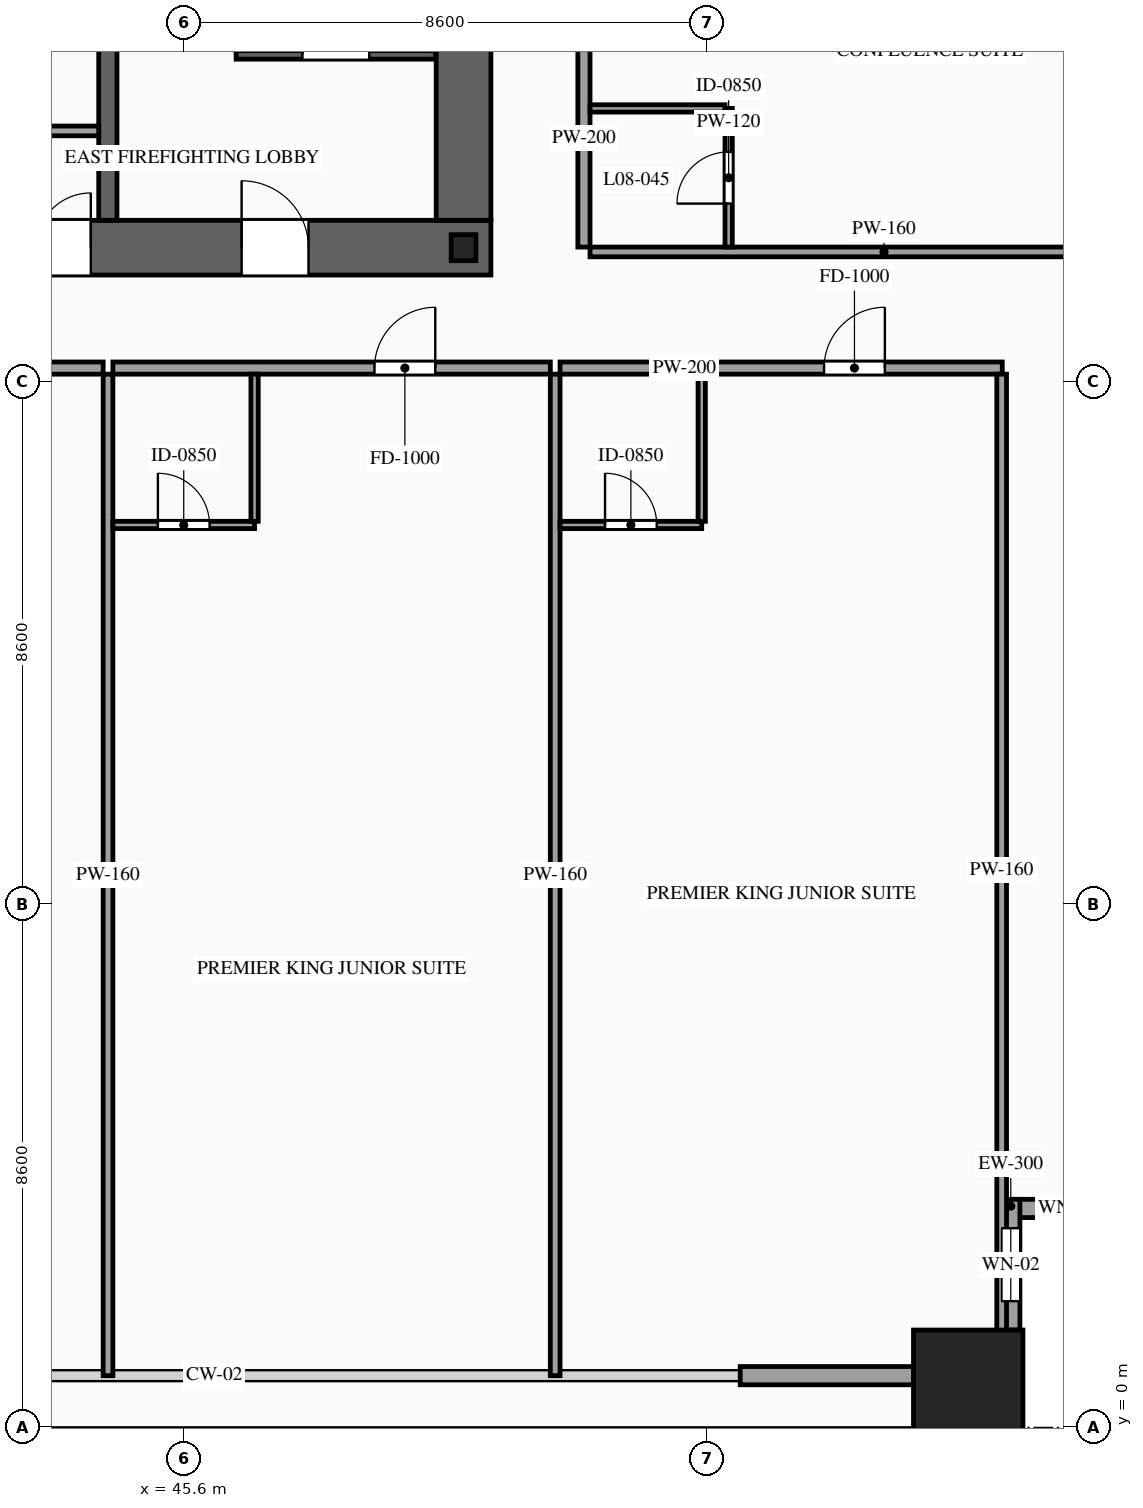
"""IFC4 building model, lengths in metres.
Left out: names, types, materials, properties, quantities, classifications, styles, units other than length and angle.
Written with IfcOpenShell. Run it as: python <this file> out.ifc"""

import sys

from ifc_helpers import new_model, si_unit, direction, frame, frame_2d, origin, origin_2d, place, context, subcontext, project, spatial, rectangle, hollow_rectangle, i_section, extrude, source, transform, mapped, element, fill, save


model = new_model("IFC4")
c1 = context("Model", 3, precision=1e-05, world=origin(), true_north=direction((0.0, 1.0)))
c2 = subcontext(c1, "Body", "Model", "MODEL_VIEW")
j1 = project(units=[si_unit("LENGTHUNIT", "METRE"), si_unit("PLANEANGLEUNIT", "RADIAN")], contexts=[c1])
p1 = place(None, origin())
s1 = spatial("IfcSite", under=j1, at=p1, CompositionType="ELEMENT")
p2 = place(p1, origin())
s2 = spatial("IfcBuilding", under=s1, at=p2, CompositionType="ELEMENT")
p3 = place(p2, frame((0.0, 0.0, 34.2)))
s3 = spatial("IfcBuildingStorey", under=s2, at=p3, CompositionType="ELEMENT", Elevation=34.2)
p4 = place(p3, frame((23.35, 19.4, 0.0), z_axis=(0.0, 0.0, 1.0), x_axis=(1.0, 0.0, 0.0)))
e1 = element("IfcWall", 1, at=p4, inside=s3, PredefinedType="SHEAR", context=c2, shape_type="SweptSolid", body=[
    extrude(rectangle(XDim=27.3, YDim=0.9, at=frame_2d((13.65, 0.0))), origin(), (0.0, 0.0, 1.0), 3.6),
])
p5 = place(p4, frame((2.1, 0.0, 0.0)))
e2 = element("IfcOpeningElement", 2, at=p5, cuts=e1, PredefinedType="OPENING", context=c2, shape_type="SweptSolid", body=[
    extrude(rectangle(XDim=1.1, YDim=2.2, at=frame_2d((0.55, 1.1))), frame((0.0, 0.465, 0.0), z_axis=(0.0, -1.0, 0.0), x_axis=(1.0, 0.0, 0.0)), (0.0, 0.0, 1.0), 0.93),
])
p6 = place(p4, frame((10.0, 0.0, 0.0)))
e3 = element("IfcOpeningElement", 3, at=p6, cuts=e1, PredefinedType="OPENING", context=c2, shape_type="SweptSolid", body=[
    extrude(rectangle(XDim=1.1, YDim=2.2, at=frame_2d((0.55, 1.1))), frame((0.0, 0.465, 0.0), z_axis=(0.0, -1.0, 0.0), x_axis=(1.0, 0.0, 0.0)), (0.0, 0.0, 1.0), 0.93),
])
p7 = place(p4, frame((23.2, 0.0, 0.0)))
e4 = element("IfcOpeningElement", 4, at=p7, cuts=e1, PredefinedType="OPENING", context=c2, shape_type="SweptSolid", body=[
    extrude(rectangle(XDim=1.1, YDim=2.2, at=frame_2d((0.55, 1.1))), frame((0.0, 0.465, 0.0), z_axis=(0.0, -1.0, 0.0), x_axis=(1.0, 0.0, 0.0)), (0.0, 0.0, 1.0), 0.93),
])
p8 = place(p4, frame((19.82, 0.0, 0.0)))
e5 = element("IfcOpeningElement", 5, at=p8, cuts=e1, PredefinedType="OPENING", context=c2, shape_type="SweptSolid", body=[
    extrude(rectangle(XDim=0.9, YDim=2.15, at=frame_2d((0.45, 1.075))), frame((0.0, 0.465, 0.0), z_axis=(0.0, -1.0, 0.0), x_axis=(1.0, 0.0, 0.0)), (0.0, 0.0, 1.0), 0.93),
])
p9 = place(p4, frame((18.38, 0.0, 0.0)))
e6 = element("IfcOpeningElement", 6, at=p9, cuts=e1, PredefinedType="OPENING", context=c2, shape_type="SweptSolid", body=[
    extrude(rectangle(XDim=0.9, YDim=2.15, at=frame_2d((0.45, 1.075))), frame((0.0, 0.465, 0.0), z_axis=(0.0, -1.0, 0.0), x_axis=(1.0, 0.0, 0.0)), (0.0, 0.0, 1.0), 0.93),
])
m1 = source(origin(), c2, "Body", "SweptSolid", [
    extrude(rectangle(XDim=11.9, YDim=0.9, at=frame_2d((5.95, 0.0))), origin(), (0.0, 0.0, 1.0), 3.6),
])
p10 = place(p3, frame((50.2, 19.85, 0.0), z_axis=(0.0, 0.0, 1.0), x_axis=(0.0, 1.0, 0.0)))
e7 = element("IfcWall", 7, at=p10, inside=s3, PredefinedType="SHEAR", context=c2, shape_type="MappedRepresentation", body=[
    mapped(m1, transform((0.0, 0.0, 0.0), scale=1.0)),
])
m2 = source(origin(), c2, "Body", "SweptSolid", [
    extrude(rectangle(XDim=11.9, YDim=0.3, at=frame_2d((5.95, 0.0))), origin(), (0.0, 0.0, 1.0), 3.6),
])
p11 = place(p3, frame((44.35, 19.85, 0.0), z_axis=(0.0, 0.0, 1.0), x_axis=(0.0, 1.0, 0.0)))
e8 = element("IfcWall", 8, at=p11, inside=s3, PredefinedType="SOLIDWALL", context=c2, shape_type="MappedRepresentation", body=[
    mapped(m2, transform((0.0, 0.0, 0.0), scale=1.0)),
])
m3 = source(origin(), c2, "Body", "SweptSolid", [
    extrude(i_section(OverallWidth=0.407, OverallDepth=0.428, WebThickness=0.02, FlangeThickness=0.035, at=origin_2d()), origin(), (0.0, 0.0, 1.0), 3.6),
])
p12 = place(p3, frame((50.2, 19.4, 0.0), z_axis=(0.0, 0.0, 1.0), x_axis=(1.0, 0.0, 0.0)))
e9 = element("IfcColumn", 9, at=p12, inside=s3, PredefinedType="COLUMN", context=c2, shape_type="MappedRepresentation", body=[
    mapped(m3, transform((0.0, 0.0, 0.0), scale=1.0)),
])
m4 = source(origin(), c2, "Body", "SweptSolid", [
    extrude(hollow_rectangle(XDim=1.8, YDim=1.8, WallThickness=0.08, at=origin_2d()), origin(), (0.0, 0.0, 1.0), 3.6),
])
p13 = place(p3, frame((58.5, 0.7, 0.0), z_axis=(0.0, 0.0, 1.0), x_axis=(1.0, 0.0, 0.0)))
e10 = element("IfcColumn", 10, at=p13, inside=s3, PredefinedType="COLUMN", context=c2, shape_type="MappedRepresentation", body=[
    mapped(m4, transform((0.0, 0.0, 0.0), scale=1.0)),
])
p14 = place(p3, frame((59.05, 3.6, 0.0), z_axis=(0.0, 0.0, 1.0), x_axis=(1.0, 0.0, 0.0)))
e11 = element("IfcWall", 11, at=p14, inside=s3, PredefinedType="SOLIDWALL", context=c2, shape_type="SweptSolid", body=[
    extrude(rectangle(XDim=2.15, YDim=0.3, at=frame_2d((1.075, 0.0))), origin(), (0.0, 0.0, 1.0), 3.38),
])
p15 = place(p14, frame((0.625, 0.0, 0.85)))
e12 = element("IfcOpeningElement", 12, at=p15, cuts=e11, PredefinedType="OPENING", context=c2, shape_type="SweptSolid", body=[
    extrude(rectangle(XDim=0.9, YDim=1.5, at=frame_2d((0.45, 0.75))), frame((0.0, 0.165, 0.0), z_axis=(0.0, -1.0, 0.0), x_axis=(1.0, 0.0, 0.0)), (0.0, 0.0, 1.0), 0.33),
])
p16 = place(p3, frame((59.2, 1.6, 0.0), z_axis=(0.0, 0.0, 1.0), x_axis=(0.0, 1.0, 0.0)))
e13 = element("IfcWall", 13, at=p16, inside=s3, PredefinedType="SOLIDWALL", context=c2, shape_type="SweptSolid", body=[
    extrude(rectangle(XDim=2.15, YDim=0.3, at=frame_2d((1.075, 0.0))), origin(), (0.0, 0.0, 1.0), 3.38),
])
p17 = place(p16, frame((0.475, 0.0, 0.85)))
e14 = element("IfcOpeningElement", 14, at=p17, cuts=e13, PredefinedType="OPENING", context=c2, shape_type="SweptSolid", body=[
    extrude(rectangle(XDim=1.2, YDim=2.1, at=frame_2d((0.6, 1.05))), frame((0.0, 0.165, 0.0), z_axis=(0.0, -1.0, 0.0), x_axis=(1.0, 0.0, 0.0)), (0.0, 0.0, 1.0), 0.33),
])
m5 = source(origin(), c2, "Body", "SweptSolid", [
    extrude(rectangle(XDim=2.85, YDim=0.3, at=frame_2d((1.425, 0.0))), origin(), (0.0, 0.0, 1.0), 2.775),
])
p18 = place(p3, frame((54.75, 0.85, 0.0), z_axis=(0.0, 0.0, 1.0), x_axis=(1.0, 0.0, 0.0)))
e15 = element("IfcWall", 15, at=p18, inside=s3, PredefinedType="SOLIDWALL", context=c2, shape_type="MappedRepresentation", body=[
    mapped(m5, transform((0.0, 0.0, 0.0), scale=1.0)),
])
p19 = place(p3, frame((46.46, 22.57, 0.0), z_axis=(0.0, 0.0, 1.0), x_axis=(1.0, 0.0, 0.0)))
e16 = element("IfcWall", 16, at=p19, inside=s3, PredefinedType="SOLIDWALL", context=c2, shape_type="SweptSolid", body=[
    extrude(rectangle(XDim=3.28, YDim=0.14, at=frame_2d((1.64, 0.0))), origin(), (0.0, 0.0, 1.0), 3.38),
])
p20 = place(p19, frame((1.09, 0.0, 0.0)))
e17 = element("IfcOpeningElement", 17, at=p20, cuts=e16, PredefinedType="OPENING", context=c2, shape_type="SweptSolid", body=[
    extrude(rectangle(XDim=1.1, YDim=2.2, at=frame_2d((0.55, 1.1))), frame((0.0, 0.085, 0.0), z_axis=(0.0, -1.0, 0.0), x_axis=(1.0, 0.0, 0.0)), (0.0, 0.0, 1.0), 0.17),
])
m6 = source(origin(), c2, "Body", "SweptSolid", [
    extrude(rectangle(XDim=1.17, YDim=0.16, at=frame_2d((0.585, 0.0))), origin(), (0.0, 0.0, 1.0), 3.38),
])
p21 = place(p3, frame((43.03, 21.32, 0.0), z_axis=(0.0, 0.0, 1.0), x_axis=(1.0, 0.0, 0.0)))
e18 = element("IfcWall", 18, at=p21, inside=s3, PredefinedType="PARTITIONING", context=c2, shape_type="MappedRepresentation", body=[
    mapped(m6, transform((0.0, 0.0, 0.0), scale=1.0)),
])
p22 = place(p3, frame((37.08, 17.42, 0.0), z_axis=(0.0, 0.0, 1.0), x_axis=(1.0, 0.0, 0.0)))
e19 = element("IfcWall", 19, at=p22, inside=s3, PredefinedType="PARTITIONING", context=c2, shape_type="SweptSolid", body=[
    extrude(rectangle(XDim=7.193, YDim=0.2, at=frame_2d((3.596, 0.0))), origin(), (0.0, 0.0, 1.0), 3.38),
])
p23 = place(p22, frame((4.302, 0.0, 0.0)))
e20 = element("IfcOpeningElement", 20, at=p23, cuts=e19, PredefinedType="OPENING", context=c2, shape_type="SweptSolid", body=[
    extrude(rectangle(XDim=1.0, YDim=2.2, at=frame_2d((0.5, 1.1))), frame((0.0, 0.115, 0.0), z_axis=(0.0, -1.0, 0.0), x_axis=(1.0, 0.0, 0.0)), (0.0, 0.0, 1.0), 0.23),
])
m7 = source(origin(), c2, "Body", "SweptSolid", [
    extrude(rectangle(XDim=16.47, YDim=0.16, at=frame_2d((8.235, 0.0))), origin(), (0.0, 0.0, 1.0), 3.38),
])
p24 = place(p3, frame((44.353, 0.85, 0.0), z_axis=(0.0, 0.0, 1.0), x_axis=(0.0, 1.0, 0.0)))
e21 = element("IfcWall", 21, at=p24, inside=s3, PredefinedType="PARTITIONING", context=c2, shape_type="MappedRepresentation", body=[
    mapped(m7, transform((0.0, 0.0, 0.0), scale=1.0)),
])
p25 = place(p3, frame((44.433, 17.42, 0.0), z_axis=(0.0, 0.0, 1.0), x_axis=(1.0, 0.0, 0.0)))
e22 = element("IfcWall", 22, at=p25, inside=s3, PredefinedType="PARTITIONING", context=c2, shape_type="SweptSolid", body=[
    extrude(rectangle(XDim=7.194, YDim=0.2, at=frame_2d((3.597, 0.0))), origin(), (0.0, 0.0, 1.0), 3.38),
])
p26 = place(p25, frame((4.302, 0.0, 0.0)))
e23 = element("IfcOpeningElement", 23, at=p26, cuts=e22, PredefinedType="OPENING", context=c2, shape_type="SweptSolid", body=[
    extrude(rectangle(XDim=1.0, YDim=2.2, at=frame_2d((0.5, 1.1))), frame((0.0, 0.115, 0.0), z_axis=(0.0, -1.0, 0.0), x_axis=(1.0, 0.0, 0.0)), (0.0, 0.0, 1.0), 0.23),
])
p27 = place(p3, frame((51.707, 0.85, 0.0), z_axis=(0.0, 0.0, 1.0), x_axis=(0.0, 1.0, 0.0)))
e24 = element("IfcWall", 24, at=p27, inside=s3, PredefinedType="PARTITIONING", context=c2, shape_type="MappedRepresentation", body=[
    mapped(m7, transform((0.0, 0.0, 0.0), scale=1.0)),
])
p28 = place(p3, frame((44.433, 14.84, 0.0), z_axis=(0.0, 0.0, 1.0), x_axis=(1.0, 0.0, 0.0)))
e25 = element("IfcWall", 25, at=p28, inside=s3, PredefinedType="PARTITIONING", context=c2, shape_type="SweptSolid", body=[
    extrude(rectangle(XDim=2.33, YDim=0.12, at=frame_2d((1.165, 0.0))), origin(), (0.0, 0.0, 1.0), 3.38),
])
p29 = place(p28, frame((0.74, 0.0, 0.0)))
e26 = element("IfcOpeningElement", 26, at=p29, cuts=e25, PredefinedType="OPENING", context=c2, shape_type="SweptSolid", body=[
    extrude(rectangle(XDim=0.85, YDim=2.1, at=frame_2d((0.425, 1.05))), frame((0.0, 0.075, 0.0), z_axis=(0.0, -1.0, 0.0), x_axis=(1.0, 0.0, 0.0)), (0.0, 0.0, 1.0), 0.15),
])
m8 = source(origin(), c2, "Body", "SweptSolid", [
    extrude(rectangle(XDim=2.42, YDim=0.12, at=frame_2d((1.21, 0.0))), origin(), (0.0, 0.0, 1.0), 3.38),
])
p30 = place(p3, frame((46.763, 14.9, 0.0), z_axis=(0.0, 0.0, 1.0), x_axis=(0.0, 1.0, 0.0)))
e27 = element("IfcWall", 27, at=p30, inside=s3, PredefinedType="PARTITIONING", context=c2, shape_type="MappedRepresentation", body=[
    mapped(m8, transform((0.0, 0.0, 0.0), scale=1.0)),
])
p31 = place(p3, frame((51.787, 17.42, 0.0), z_axis=(0.0, 0.0, 1.0), x_axis=(1.0, 0.0, 0.0)))
e28 = element("IfcWall", 28, at=p31, inside=s3, PredefinedType="PARTITIONING", context=c2, shape_type="SweptSolid", body=[
    extrude(rectangle(XDim=7.273, YDim=0.2, at=frame_2d((3.636, 0.0))), origin(), (0.0, 0.0, 1.0), 3.38),
])
p32 = place(p31, frame((4.342, 0.0, 0.0)))
e29 = element("IfcOpeningElement", 29, at=p32, cuts=e28, PredefinedType="OPENING", context=c2, shape_type="SweptSolid", body=[
    extrude(rectangle(XDim=1.0, YDim=2.2, at=frame_2d((0.5, 1.1))), frame((0.0, 0.115, 0.0), z_axis=(0.0, -1.0, 0.0), x_axis=(1.0, 0.0, 0.0)), (0.0, 0.0, 1.0), 0.23),
])
m9 = source(origin(), c2, "Body", "SweptSolid", [
    extrude(rectangle(XDim=16.32, YDim=0.16, at=frame_2d((8.16, 0.0))), origin(), (0.0, 0.0, 1.0), 3.38),
])
p33 = place(p3, frame((59.05, 1.0, 0.0), z_axis=(0.0, 0.0, 1.0), x_axis=(0.0, 1.0, 0.0)))
e30 = element("IfcWall", 30, at=p33, inside=s3, PredefinedType="PARTITIONING", context=c2, shape_type="MappedRepresentation", body=[
    mapped(m9, transform((0.0, 0.0, 0.0), scale=1.0)),
])
p34 = place(p3, frame((51.787, 14.84, 0.0), z_axis=(0.0, 0.0, 1.0), x_axis=(1.0, 0.0, 0.0)))
e31 = element("IfcWall", 31, at=p34, inside=s3, PredefinedType="PARTITIONING", context=c2, shape_type="SweptSolid", body=[
    extrude(rectangle(XDim=2.33, YDim=0.12, at=frame_2d((1.165, 0.0))), origin(), (0.0, 0.0, 1.0), 3.38),
])
p35 = place(p34, frame((0.74, 0.0, 0.0)))
e32 = element("IfcOpeningElement", 32, at=p35, cuts=e31, PredefinedType="OPENING", context=c2, shape_type="SweptSolid", body=[
    extrude(rectangle(XDim=0.85, YDim=2.1, at=frame_2d((0.425, 1.05))), frame((0.0, 0.075, 0.0), z_axis=(0.0, -1.0, 0.0), x_axis=(1.0, 0.0, 0.0)), (0.0, 0.0, 1.0), 0.15),
])
p36 = place(p3, frame((54.117, 14.9, 0.0), z_axis=(0.0, 0.0, 1.0), x_axis=(0.0, 1.0, 0.0)))
e33 = element("IfcWall", 33, at=p36, inside=s3, PredefinedType="PARTITIONING", context=c2, shape_type="MappedRepresentation", body=[
    mapped(m8, transform((0.0, 0.0, 0.0), scale=1.0)),
])
p37 = place(p3, frame((52.18, 19.41, 0.0), z_axis=(0.0, 0.0, 1.0), x_axis=(0.0, 1.0, 0.0)))
e34 = element("IfcWall", 34, at=p37, inside=s3, PredefinedType="PARTITIONING", context=c2, shape_type="SweptSolid", body=[
    extrude(rectangle(XDim=6.31, YDim=0.2, at=frame_2d((3.155, 0.0))), origin(), (0.0, 0.0, 1.0), 3.38),
])
p38 = place(p37, frame((3.835, 0.0, 0.0)))
e35 = element("IfcOpeningElement", 35, at=p38, cuts=e34, PredefinedType="OPENING", context=c2, shape_type="SweptSolid", body=[
    extrude(rectangle(XDim=1.0, YDim=2.2, at=frame_2d((0.5, 1.1))), frame((0.0, 0.115, 0.0), z_axis=(0.0, -1.0, 0.0), x_axis=(1.0, 0.0, 0.0)), (0.0, 0.0, 1.0), 0.23),
])
m10 = source(origin(), c2, "Body", "SweptSolid", [
    extrude(rectangle(XDim=9.67, YDim=0.16, at=frame_2d((4.835, 0.0))), origin(), (0.0, 0.0, 1.0), 2.875),
])
p39 = place(p3, frame((52.28, 19.33, 0.0), z_axis=(0.0, 0.0, 1.0), x_axis=(1.0, 0.0, 0.0)))
e36 = element("IfcWall", 36, at=p39, inside=s3, PredefinedType="PARTITIONING", context=c2, shape_type="MappedRepresentation", body=[
    mapped(m10, transform((0.0, 0.0, 0.0), scale=1.0)),
])
p40 = place(p3, frame((54.56, 19.41, 0.0), z_axis=(0.0, 0.0, 1.0), x_axis=(0.0, 1.0, 0.0)))
e37 = element("IfcWall", 37, at=p40, inside=s3, PredefinedType="PARTITIONING", context=c2, shape_type="SweptSolid", body=[
    extrude(rectangle(XDim=2.28, YDim=0.12, at=frame_2d((1.14, 0.0))), origin(), (0.0, 0.0, 1.0), 3.38),
])
p41 = place(p40, frame((0.715, 0.0, 0.0)))
e38 = element("IfcOpeningElement", 38, at=p41, cuts=e37, PredefinedType="OPENING", context=c2, shape_type="SweptSolid", body=[
    extrude(rectangle(XDim=0.85, YDim=2.1, at=frame_2d((0.425, 1.05))), frame((0.0, 0.075, 0.0), z_axis=(0.0, -1.0, 0.0), x_axis=(1.0, 0.0, 0.0)), (0.0, 0.0, 1.0), 0.15),
])
m11 = source(origin(), c2, "Body", "SweptSolid", [
    extrude(rectangle(XDim=2.22, YDim=0.12, at=frame_2d((1.11, 0.0))), origin(), (0.0, 0.0, 1.0), 3.38),
])
p42 = place(p3, frame((52.28, 21.69, 0.0), z_axis=(0.0, 0.0, 1.0), x_axis=(1.0, 0.0, 0.0)))
e39 = element("IfcWall", 39, at=p42, inside=s3, PredefinedType="PARTITIONING", context=c2, shape_type="MappedRepresentation", body=[
    mapped(m11, transform((0.0, 0.0, 0.0), scale=1.0)),
])
m12 = source(origin(), c2, "Body", "SweptSolid", [
    extrude(rectangle(XDim=0.9, YDim=1.5, at=frame_2d((0.45, 0.75))), frame((0.0, 0.03, 0.0), z_axis=(0.0, -1.0, 0.0), x_axis=(1.0, 0.0, 0.0)), (0.0, 0.0, 1.0), 0.06),
])
p43 = place(p15, origin())
e40 = element("IfcWindow", 40, at=p43, inside=s3, PartitioningType="SINGLE_PANEL", PredefinedType="WINDOW", context=c2, shape_type="MappedRepresentation", body=[
    mapped(m12, transform((0.0, 0.0, 0.0), scale=1.0)),
])
fill(e12, e40)
m13 = source(origin(), c2, "Body", "SweptSolid", [
    extrude(rectangle(XDim=1.2, YDim=2.1, at=frame_2d((0.6, 1.05))), frame((0.0, 0.03, 0.0), z_axis=(0.0, -1.0, 0.0), x_axis=(1.0, 0.0, 0.0)), (0.0, 0.0, 1.0), 0.06),
])
p44 = place(p17, origin())
e41 = element("IfcWindow", 41, at=p44, inside=s3, PartitioningType="SINGLE_PANEL", PredefinedType="WINDOW", context=c2, shape_type="MappedRepresentation", body=[
    mapped(m13, transform((0.0, 0.0, 0.0), scale=1.0)),
])
fill(e14, e41)
m14 = source(origin(), c2, "Body", "SweptSolid", [
    extrude(rectangle(XDim=1.1, YDim=2.2, at=frame_2d((0.55, 1.1))), frame((0.0, 0.025, 0.0), z_axis=(0.0, -1.0, 0.0), x_axis=(1.0, 0.0, 0.0)), (0.0, 0.0, 1.0), 0.05),
])
p45 = place(p20, origin())
e42 = element("IfcDoor", 42, at=p45, inside=s3, OperationType="SINGLE_SWING_LEFT", PredefinedType="DOOR", context=c2, shape_type="MappedRepresentation", body=[
    mapped(m14, transform((0.0, 0.0, 0.0), scale=1.0)),
])
fill(e17, e42)
p46 = place(p7, origin())
e43 = element("IfcDoor", 43, at=p46, inside=s3, OperationType="SINGLE_SWING_LEFT", PredefinedType="DOOR", context=c2, shape_type="MappedRepresentation", body=[
    mapped(m14, transform((0.0, 0.0, 0.0), scale=1.0)),
])
fill(e4, e43)
m15 = source(origin(), c2, "Body", "SweptSolid", [
    extrude(rectangle(XDim=0.9, YDim=2.15, at=frame_2d((0.45, 1.075))), frame((0.0, 0.025, 0.0), z_axis=(0.0, -1.0, 0.0), x_axis=(1.0, 0.0, 0.0)), (0.0, 0.0, 1.0), 0.05),
])
p47 = place(p8, origin())
e44 = element("IfcDoor", 44, at=p47, inside=s3, OperationType="SINGLE_SWING_RIGHT", PredefinedType="DOOR", context=c2, shape_type="MappedRepresentation", body=[
    mapped(m15, transform((0.0, 0.0, 0.0), scale=1.0)),
])
fill(e5, e44)
m16 = source(origin(), c2, "Body", "SweptSolid", [
    extrude(rectangle(XDim=1.0, YDim=2.2, at=frame_2d((0.5, 1.1))), frame((0.0, 0.025, 0.0), z_axis=(0.0, -1.0, 0.0), x_axis=(1.0, 0.0, 0.0)), (0.0, 0.0, 1.0), 0.05),
])
p48 = place(p26, origin())
e45 = element("IfcDoor", 45, at=p48, inside=s3, OperationType="SINGLE_SWING_RIGHT", PredefinedType="DOOR", context=c2, shape_type="MappedRepresentation", body=[
    mapped(m16, transform((0.0, 0.0, 0.0), scale=1.0)),
])
fill(e23, e45)
m17 = source(origin(), c2, "Body", "SweptSolid", [
    extrude(rectangle(XDim=0.85, YDim=2.1, at=frame_2d((0.425, 1.05))), frame((0.0, 0.025, 0.0), z_axis=(0.0, -1.0, 0.0), x_axis=(1.0, 0.0, 0.0)), (0.0, 0.0, 1.0), 0.05),
])
p49 = place(p29, origin())
e46 = element("IfcDoor", 46, at=p49, inside=s3, OperationType="SINGLE_SWING_LEFT", PredefinedType="DOOR", context=c2, shape_type="MappedRepresentation", body=[
    mapped(m17, transform((0.0, 0.0, 0.0), scale=1.0)),
])
fill(e26, e46)
p50 = place(p32, origin())
e47 = element("IfcDoor", 47, at=p50, inside=s3, OperationType="SINGLE_SWING_RIGHT", PredefinedType="DOOR", context=c2, shape_type="MappedRepresentation", body=[
    mapped(m16, transform((0.0, 0.0, 0.0), scale=1.0)),
])
fill(e29, e47)
p51 = place(p35, origin())
e48 = element("IfcDoor", 48, at=p51, inside=s3, OperationType="SINGLE_SWING_LEFT", PredefinedType="DOOR", context=c2, shape_type="MappedRepresentation", body=[
    mapped(m17, transform((0.0, 0.0, 0.0), scale=1.0)),
])
fill(e32, e48)
p52 = place(p41, origin())
e49 = element("IfcDoor", 49, at=p52, inside=s3, OperationType="SINGLE_SWING_LEFT", PredefinedType="DOOR", context=c2, shape_type="MappedRepresentation", body=[
    mapped(m17, transform((0.0, 0.0, 0.0), scale=1.0)),
])
fill(e38, e49)
save(model, sys.argv[1])
